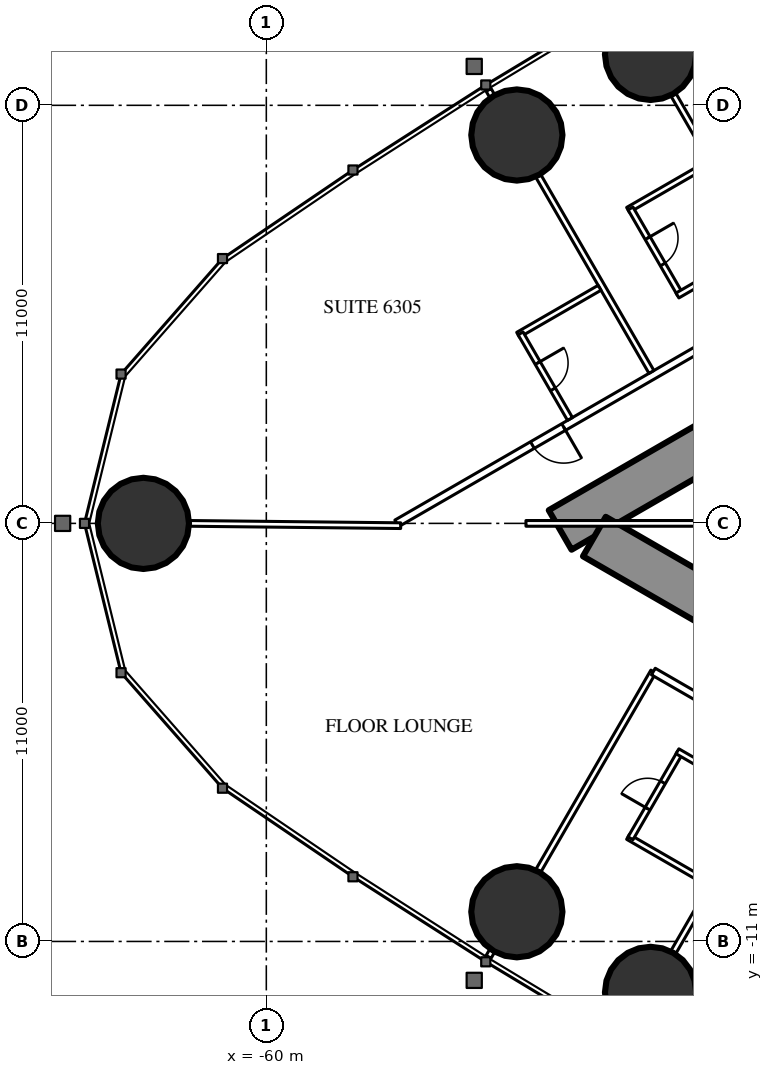
"""IFC4 building model, lengths in metres.
Left out: names, types, materials, properties, quantities, classifications, styles, units other than length and angle.
Written with IfcOpenShell. Run it as: python <this file> out.ifc"""

import sys

from ifc_helpers import new_model, si_unit, direction, frame, frame_2d, origin, origin_2d, place, context, subcontext, project, spatial, rectangle, circle, extrude, element, fill, save


model = new_model("IFC4")
c1 = context("Model", 3, precision=1e-05, world=origin(), true_north=direction((0.0, 1.0)))
c2 = subcontext(c1, "Body", "Model", "MODEL_VIEW")
j1 = project(units=[si_unit("LENGTHUNIT", "METRE"), si_unit("PLANEANGLEUNIT", "RADIAN")], contexts=[c1])
p1 = place(None, origin())
s1 = spatial("IfcSite", under=j1, at=p1, CompositionType="ELEMENT")
p2 = place(p1, origin())
s2 = spatial("IfcBuilding", under=s1, at=p2, CompositionType="ELEMENT")
p3 = place(p2, frame((0.0, 0.0, 236.9)))
s3 = spatial("IfcBuildingStorey", under=s2, at=p3, CompositionType="ELEMENT", Elevation=236.9)
for number, where, z_axis, x_axis in (
    (1, (-63.234, 0.0, 0.0), (0.0, 0.0, 1.0), (1.0, 0.0, 0.0)),
    (2, (-53.408, -10.219, 0.0), (0.0, 0.0, 1.0), (1.0, 0.0, 0.0)),
    (3, (-49.89, -12.34, 0.0), (0.0, 0.0, 1.0), (1.0, 0.0, 0.0)),
    (4, (-49.89, 12.34, 0.0), (0.0, 0.0, 1.0), (1.0, 0.0, 0.0)),
    (5, (-53.408, 10.219, 0.0), (0.0, 0.0, 1.0), (1.0, 0.0, 0.0)),
):
    element("IfcColumn", number, at=place(p3, frame(where, z_axis=z_axis, x_axis=x_axis)), inside=s3, PredefinedType="COLUMN", context=c2, shape_type="SweptSolid", body=[
        extrude(circle(Radius=1.2, at=origin_2d()), origin(), (0.0, 0.0, 1.0), 3.6),
    ])
p4 = place(p3, frame((-27.2, 14.3, 0.0), z_axis=(0.0, 0.0, 1.0), x_axis=(-0.866026593062, -0.499997940104, 0.0)))
e6 = element("IfcWall", 6, at=p4, inside=s3, PredefinedType="SHEAR", context=c2, shape_type="SweptSolid", body=[
    extrude(rectangle(XDim=28.946, YDim=1.2, at=frame_2d((14.473, 0.0))), origin(), (0.0, 0.0, 1.0), 3.6),
])
p5 = place(p4, frame((4.6, 0.0, 0.0)))
e7 = element("IfcOpeningElement", 7, at=p5, cuts=e6, PredefinedType="OPENING", context=c2, shape_type="SweptSolid", body=[
    extrude(rectangle(XDim=1.0, YDim=2.2, at=frame_2d((0.5, 1.1))), frame((0.0, 0.61, 0.0), z_axis=(0.0, -1.0, 0.0), x_axis=(1.0, 0.0, 0.0)), (0.0, 0.0, 1.0), 1.22),
])
p6 = place(p4, frame((13.395, 0.0, 0.0)))
e8 = element("IfcOpeningElement", 8, at=p6, cuts=e6, PredefinedType="OPENING", context=c2, shape_type="SweptSolid", body=[
    extrude(rectangle(XDim=1.8, YDim=2.2, at=frame_2d((0.9, 1.1))), frame((0.0, 0.61, 0.0), z_axis=(0.0, -1.0, 0.0), x_axis=(1.0, 0.0, 0.0)), (0.0, 0.0, 1.0), 1.22),
])
p7 = place(p3, frame((-27.2, -14.3, 0.0), z_axis=(0.0, 0.0, 1.0), x_axis=(-0.866024021859, 0.500002393557, 0.0)))
e9 = element("IfcWall", 9, at=p7, inside=s3, PredefinedType="SHEAR", context=c2, shape_type="SweptSolid", body=[
    extrude(rectangle(XDim=27.907, YDim=1.2, at=frame_2d((13.954, 0.0))), origin(), (0.0, 0.0, 1.0), 3.6),
])
p8 = place(p7, frame((4.6, 0.0, 0.0)))
e10 = element("IfcOpeningElement", 10, at=p8, cuts=e9, PredefinedType="OPENING", context=c2, shape_type="SweptSolid", body=[
    extrude(rectangle(XDim=1.0, YDim=2.2, at=frame_2d((0.5, 1.1))), frame((0.0, 0.61, 0.0), z_axis=(0.0, -1.0, 0.0), x_axis=(1.0, 0.0, 0.0)), (0.0, 0.0, 1.0), 1.22),
])
p9 = place(p7, frame((13.395, 0.0, 0.0)))
e11 = element("IfcOpeningElement", 11, at=p9, cuts=e9, PredefinedType="OPENING", context=c2, shape_type="SweptSolid", body=[
    extrude(rectangle(XDim=1.8, YDim=2.2, at=frame_2d((0.9, 1.1))), frame((0.0, 0.61, 0.0), z_axis=(0.0, -1.0, 0.0), x_axis=(1.0, 0.0, 0.0)), (0.0, 0.0, 1.0), 1.22),
])
p10 = place(p3, frame((-28.737, 16.068, 0.0), z_axis=(0.0, 0.0, 1.0), x_axis=(-0.866026057212, -0.499998868229, 0.0)))
e12 = element("IfcWall", 12, at=p10, inside=s3, PredefinedType="PARTITIONING", context=c2, shape_type="SweptSolid", body=[
    extrude(rectangle(XDim=32.137, YDim=0.2, at=frame_2d((16.068, 0.0))), origin(), (0.0, 0.0, 1.0), 3.35),
])
p11 = place(p10, frame((1.08, 0.0, 0.0)))
e13 = element("IfcOpeningElement", 13, at=p11, cuts=e12, PredefinedType="OPENING", context=c2, shape_type="SweptSolid", body=[
    extrude(rectangle(XDim=1.8, YDim=2.03, at=frame_2d((0.9, 1.015))), frame((0.0, 0.11, 0.0), z_axis=(0.0, -1.0, 0.0), x_axis=(1.0, 0.0, 0.0)), (0.0, 0.0, 1.0), 0.22),
])
p12 = place(p10, frame((6.86, 0.0, 0.0)))
e14 = element("IfcOpeningElement", 14, at=p12, cuts=e12, PredefinedType="OPENING", context=c2, shape_type="SweptSolid", body=[
    extrude(rectangle(XDim=1.0, YDim=2.2, at=frame_2d((0.5, 1.1))), frame((0.0, 0.11, 0.0), z_axis=(0.0, -1.0, 0.0), x_axis=(1.0, 0.0, 0.0)), (0.0, 0.0, 1.0), 0.22),
])
p13 = place(p10, frame((16.418, 0.0, 0.0)))
e15 = element("IfcOpeningElement", 15, at=p13, cuts=e12, PredefinedType="OPENING", context=c2, shape_type="SweptSolid", body=[
    extrude(rectangle(XDim=0.95, YDim=2.2, at=frame_2d((0.475, 1.1))), frame((0.0, 0.11, 0.0), z_axis=(0.0, -1.0, 0.0), x_axis=(1.0, 0.0, 0.0)), (0.0, 0.0, 1.0), 0.22),
])
p14 = place(p10, frame((20.567, 0.0, 0.0)))
e16 = element("IfcOpeningElement", 16, at=p14, cuts=e12, PredefinedType="OPENING", context=c2, shape_type="SweptSolid", body=[
    extrude(rectangle(XDim=0.95, YDim=2.2, at=frame_2d((0.475, 1.1))), frame((0.0, 0.11, 0.0), z_axis=(0.0, -1.0, 0.0), x_axis=(1.0, 0.0, 0.0)), (0.0, 0.0, 1.0), 0.22),
])
p15 = place(p10, frame((27.065, 0.0, 0.0)))
e17 = element("IfcOpeningElement", 17, at=p15, cuts=e12, PredefinedType="OPENING", context=c2, shape_type="SweptSolid", body=[
    extrude(rectangle(XDim=0.95, YDim=2.2, at=frame_2d((0.475, 1.1))), frame((0.0, 0.11, 0.0), z_axis=(0.0, -1.0, 0.0), x_axis=(1.0, 0.0, 0.0)), (0.0, 0.0, 1.0), 0.22),
])
p16 = place(p3, frame((-46.274, 6.059, 0.0), z_axis=(0.0, 0.0, 1.0), x_axis=(-0.500020471368, 0.866013584312, 0.0)))
e18 = element("IfcWall", 18, at=p16, inside=s3, PredefinedType="PARTITIONING", context=c2, shape_type="SweptSolid", body=[
    extrude(rectangle(XDim=6.028, YDim=0.15, at=frame_2d((3.014, 0.0))), origin(), (0.0, 0.0, 1.0), 2.45),
])
p17 = place(p3, frame((-49.866, 3.985, 0.0), z_axis=(0.0, 0.0, 1.0), x_axis=(-0.500000694566, 0.866025002776, 0.0)))
e19 = element("IfcWall", 19, at=p17, inside=s3, PredefinedType="PARTITIONING", context=c2, shape_type="SweptSolid", body=[
    extrude(rectangle(XDim=5.95, YDim=0.15, at=frame_2d((2.975, 0.0))), origin(), (0.0, 0.0, 1.0), 2.45),
])
p18 = place(p3, frame((-54.061, 11.25, 0.0), z_axis=(0.0, 0.0, 1.0), x_axis=(-0.500391173478, 0.865799441849, 0.0)))
e20 = element("IfcWall", 20, at=p18, inside=s3, PredefinedType="PARTITIONING", context=c2, shape_type="SweptSolid", body=[
    extrude(rectangle(XDim=0.179, YDim=0.15, at=frame_2d((0.089, 0.0))), origin(), (0.0, 0.0, 1.0), 2.45),
])
p19 = place(p3, frame((-46.274, -6.059, 0.0), z_axis=(0.0, 0.0, 1.0), x_axis=(-0.500020471368, -0.866013584312, 0.0)))
e21 = element("IfcWall", 21, at=p19, inside=s3, PredefinedType="PARTITIONING", context=c2, shape_type="SweptSolid", body=[
    extrude(rectangle(XDim=6.028, YDim=0.15, at=frame_2d((3.014, 0.0))), origin(), (0.0, 0.0, 1.0), 2.45),
])
p20 = place(p3, frame((-49.816, -3.898, 0.0), z_axis=(0.0, 0.0, 1.0), x_axis=(-0.500001913541, -0.866024298998, 0.0)))
e22 = element("IfcWall", 22, at=p20, inside=s3, PredefinedType="PARTITIONING", context=c2, shape_type="SweptSolid", body=[
    extrude(rectangle(XDim=6.05, YDim=0.15, at=frame_2d((3.025, 0.0))), origin(), (0.0, 0.0, 1.0), 2.45),
])
p21 = place(p3, frame((-54.061, -11.25, 0.0), z_axis=(0.0, 0.0, 1.0), x_axis=(-0.500391173478, -0.865799441849, 0.0)))
e23 = element("IfcWall", 23, at=p21, inside=s3, PredefinedType="PARTITIONING", context=c2, shape_type="SweptSolid", body=[
    extrude(rectangle(XDim=0.179, YDim=0.15, at=frame_2d((0.089, 0.0))), origin(), (0.0, 0.0, 1.0), 2.45),
])
p22 = place(p3, frame((-56.464, -0.06, 0.0), z_axis=(0.0, 0.0, 1.0), x_axis=(-0.999941455167, 0.01082063951, 0.0)))
e24 = element("IfcWall", 24, at=p22, inside=s3, PredefinedType="PARTITIONING", context=c2, shape_type="SweptSolid", body=[
    extrude(rectangle(XDim=5.55, YDim=0.15, at=frame_2d((2.775, 0.0))), origin(), (0.0, 0.0, 1.0), 2.45),
])
p23 = place(p3, frame((-48.339, 9.486, 0.0), z_axis=(0.0, 0.0, 1.0), x_axis=(-0.866006523861, -0.500032699561, 0.0)))
e25 = element("IfcWall", 25, at=p23, inside=s3, PredefinedType="PARTITIONING", context=c2, shape_type="SweptSolid", body=[
    extrude(rectangle(XDim=2.475, YDim=0.15, at=frame_2d((1.237, 0.0))), origin(), (0.0, 0.0, 1.0), 3.35),
])
p24 = place(p3, frame((-49.117, 6.034, 0.0), z_axis=(0.0, 0.0, 1.0), x_axis=(-0.500006934395, 0.866021400173, 0.0)))
e26 = element("IfcWall", 26, at=p24, inside=s3, PredefinedType="PARTITIONING", context=c2, shape_type="SweptSolid", body=[
    extrude(rectangle(XDim=2.6, YDim=0.15, at=frame_2d((1.3, 0.0))), origin(), (0.0, 0.0, 1.0), 3.35),
])
p25 = place(p24, frame((0.9, 0.0, 0.0)))
e27 = element("IfcOpeningElement", 27, at=p25, cuts=e26, PredefinedType="OPENING", context=c2, shape_type="SweptSolid", body=[
    extrude(rectangle(XDim=0.8, YDim=2.2, at=frame_2d((0.4, 1.1))), frame((0.0, 0.085, 0.0), z_axis=(0.0, -1.0, 0.0), x_axis=(1.0, 0.0, 0.0)), (0.0, 0.0, 1.0), 0.17),
])
for number, where, z_axis, x_axis in (
    (28, (-47.039, 7.234, 0.0), (0.0, 0.0, 1.0), (-0.866, -0.5, 0.0)),
    (29, (-51.231, 6.199, 0.0), (0.0, 0.0, 1.0), (-0.866, -0.5, 0.0)),
):
    element("IfcWall", number, at=place(p3, frame(where, z_axis=z_axis, x_axis=x_axis)), inside=s3, PredefinedType="PARTITIONING", context=c2, shape_type="SweptSolid", body=[
        extrude(rectangle(XDim=2.475, YDim=0.15, at=frame_2d((1.238, 0.0))), origin(), (0.0, 0.0, 1.0), 3.35),
    ])
p26 = place(p3, frame((-52.01, 2.747, 0.0), z_axis=(0.0, 0.0, 1.0), x_axis=(-0.500006934395, 0.866021400173, 0.0)))
e30 = element("IfcWall", 30, at=p26, inside=s3, PredefinedType="PARTITIONING", context=c2, shape_type="SweptSolid", body=[
    extrude(rectangle(XDim=2.6, YDim=0.15, at=frame_2d((1.3, 0.0))), origin(), (0.0, 0.0, 1.0), 3.35),
])
p27 = place(p26, frame((0.9, 0.0, 0.0)))
e31 = element("IfcOpeningElement", 31, at=p27, cuts=e30, PredefinedType="OPENING", context=c2, shape_type="SweptSolid", body=[
    extrude(rectangle(XDim=0.8, YDim=2.2, at=frame_2d((0.4, 1.1))), frame((0.0, 0.085, 0.0), z_axis=(0.0, -1.0, 0.0), x_axis=(1.0, 0.0, 0.0)), (0.0, 0.0, 1.0), 0.17),
])
p28 = place(p3, frame((-48.339, -9.486, 0.0), z_axis=(0.0, 0.0, 1.0), x_axis=(-0.866006523861, 0.500032699561, 0.0)))
e32 = element("IfcWall", 32, at=p28, inside=s3, PredefinedType="PARTITIONING", context=c2, shape_type="SweptSolid", body=[
    extrude(rectangle(XDim=2.475, YDim=0.15, at=frame_2d((1.237, 0.0))), origin(), (0.0, 0.0, 1.0), 3.35),
])
p29 = place(p3, frame((-49.117, -6.034, 0.0), z_axis=(0.0, 0.0, 1.0), x_axis=(-0.500006934395, -0.866021400173, 0.0)))
e33 = element("IfcWall", 33, at=p29, inside=s3, PredefinedType="PARTITIONING", context=c2, shape_type="SweptSolid", body=[
    extrude(rectangle(XDim=2.6, YDim=0.15, at=frame_2d((1.3, 0.0))), origin(), (0.0, 0.0, 1.0), 3.35),
])
p30 = place(p29, frame((0.9, 0.0, 0.0)))
e34 = element("IfcOpeningElement", 34, at=p30, cuts=e33, PredefinedType="OPENING", context=c2, shape_type="SweptSolid", body=[
    extrude(rectangle(XDim=0.8, YDim=2.2, at=frame_2d((0.4, 1.1))), frame((0.0, 0.085, 0.0), z_axis=(0.0, -1.0, 0.0), x_axis=(1.0, 0.0, 0.0)), (0.0, 0.0, 1.0), 0.17),
])
p31 = place(p3, frame((-47.039, -7.234, 0.0), z_axis=(0.0, 0.0, 1.0), x_axis=(-0.866073894602, 0.499916002032, 0.0)))
e35 = element("IfcWall", 35, at=p31, inside=s3, PredefinedType="PARTITIONING", context=c2, shape_type="SweptSolid", body=[
    extrude(rectangle(XDim=2.475, YDim=0.15, at=frame_2d((1.238, 0.0))), origin(), (0.0, 0.0, 1.0), 2.5),
])
p32 = place(p3, frame((-44.715, -6.844, 0.0), z_axis=(0.0, 0.0, 1.0), x_axis=(-0.866020627653, 0.50000827241, 0.0)))
e36 = element("IfcWall", 36, at=p32, inside=s3, PredefinedType="PARTITIONING", context=c2, shape_type="SweptSolid", body=[
    extrude(rectangle(XDim=5.891, YDim=0.2, at=frame_2d((2.945, 0.0))), origin(), (0.0, 0.0, 1.0), 3.35),
])
p33 = place(p32, frame((2.117, 0.0, 0.0)))
e37 = element("IfcOpeningElement", 37, at=p33, cuts=e36, PredefinedType="OPENING", context=c2, shape_type="SweptSolid", body=[
    extrude(rectangle(XDim=0.95, YDim=2.2, at=frame_2d((0.475, 1.1))), frame((0.0, 0.11, 0.0), z_axis=(0.0, -1.0, 0.0), x_axis=(1.0, 0.0, 0.0)), (0.0, 0.0, 1.0), 0.22),
])
p34 = place(p32, frame((0.5, 0.0, 0.0)))
e38 = element("IfcOpeningElement", 38, at=p34, cuts=e36, PredefinedType="OPENING", context=c2, shape_type="SweptSolid", body=[
    extrude(rectangle(XDim=0.967, YDim=2.2, at=frame_2d((0.483, 1.1))), frame((0.0, 0.11, 0.0), z_axis=(0.0, -1.0, 0.0), x_axis=(1.0, 0.0, 0.0)), (0.0, 0.0, 1.0), 0.22),
])
p35 = place(p3, frame((-43.075, 0.0, 0.0), z_axis=(0.0, 0.0, 1.0), x_axis=(-1.0, 0.0, 0.0)))
e39 = element("IfcWall", 39, at=p35, inside=s3, PredefinedType="PARTITIONING", context=c2, shape_type="SweptSolid", body=[
    extrude(rectangle(XDim=10.093, YDim=0.15, at=frame_2d((5.047, 0.0))), origin(), (0.0, 0.0, 1.0), 2.45),
])
p36 = place(p25, origin())
e40 = element("IfcDoor", 40, at=p36, inside=s3, OperationType="SINGLE_SWING_RIGHT", PredefinedType="DOOR", context=c2, shape_type="SweptSolid", body=[
    extrude(rectangle(XDim=0.8, YDim=2.2, at=frame_2d((0.4, 1.1))), frame((0.0, 0.025, 0.0), z_axis=(0.0, -1.0, 0.0), x_axis=(1.0, 0.0, 0.0)), (0.0, 0.0, 1.0), 0.05),
])
fill(e27, e40)
p37 = place(p27, origin())
e41 = element("IfcDoor", 41, at=p37, inside=s3, OperationType="SINGLE_SWING_RIGHT", PredefinedType="DOOR", context=c2, shape_type="SweptSolid", body=[
    extrude(rectangle(XDim=0.8, YDim=2.2, at=frame_2d((0.4, 1.1))), frame((0.0, 0.025, 0.0), z_axis=(0.0, -1.0, 0.0), x_axis=(1.0, 0.0, 0.0)), (0.0, 0.0, 1.0), 0.05),
])
fill(e31, e41)
p38 = place(p15, origin())
e42 = element("IfcDoor", 42, at=p38, inside=s3, OperationType="SINGLE_SWING_LEFT", PredefinedType="DOOR", context=c2, shape_type="SweptSolid", body=[
    extrude(rectangle(XDim=0.95, YDim=2.2, at=frame_2d((0.475, 1.1))), frame((0.0, 0.025, 0.0), z_axis=(0.0, -1.0, 0.0), x_axis=(1.0, 0.0, 0.0)), (0.0, 0.0, 1.0), 0.05),
])
fill(e17, e42)
p39 = place(p30, origin())
e43 = element("IfcDoor", 43, at=p39, inside=s3, OperationType="SINGLE_SWING_RIGHT", PredefinedType="DOOR", context=c2, shape_type="SweptSolid", body=[
    extrude(rectangle(XDim=0.8, YDim=2.2, at=frame_2d((0.4, 1.1))), frame((0.0, 0.025, 0.0), z_axis=(0.0, -1.0, 0.0), x_axis=(1.0, 0.0, 0.0)), (0.0, 0.0, 1.0), 0.05),
])
fill(e34, e43)
save(model, sys.argv[1])
